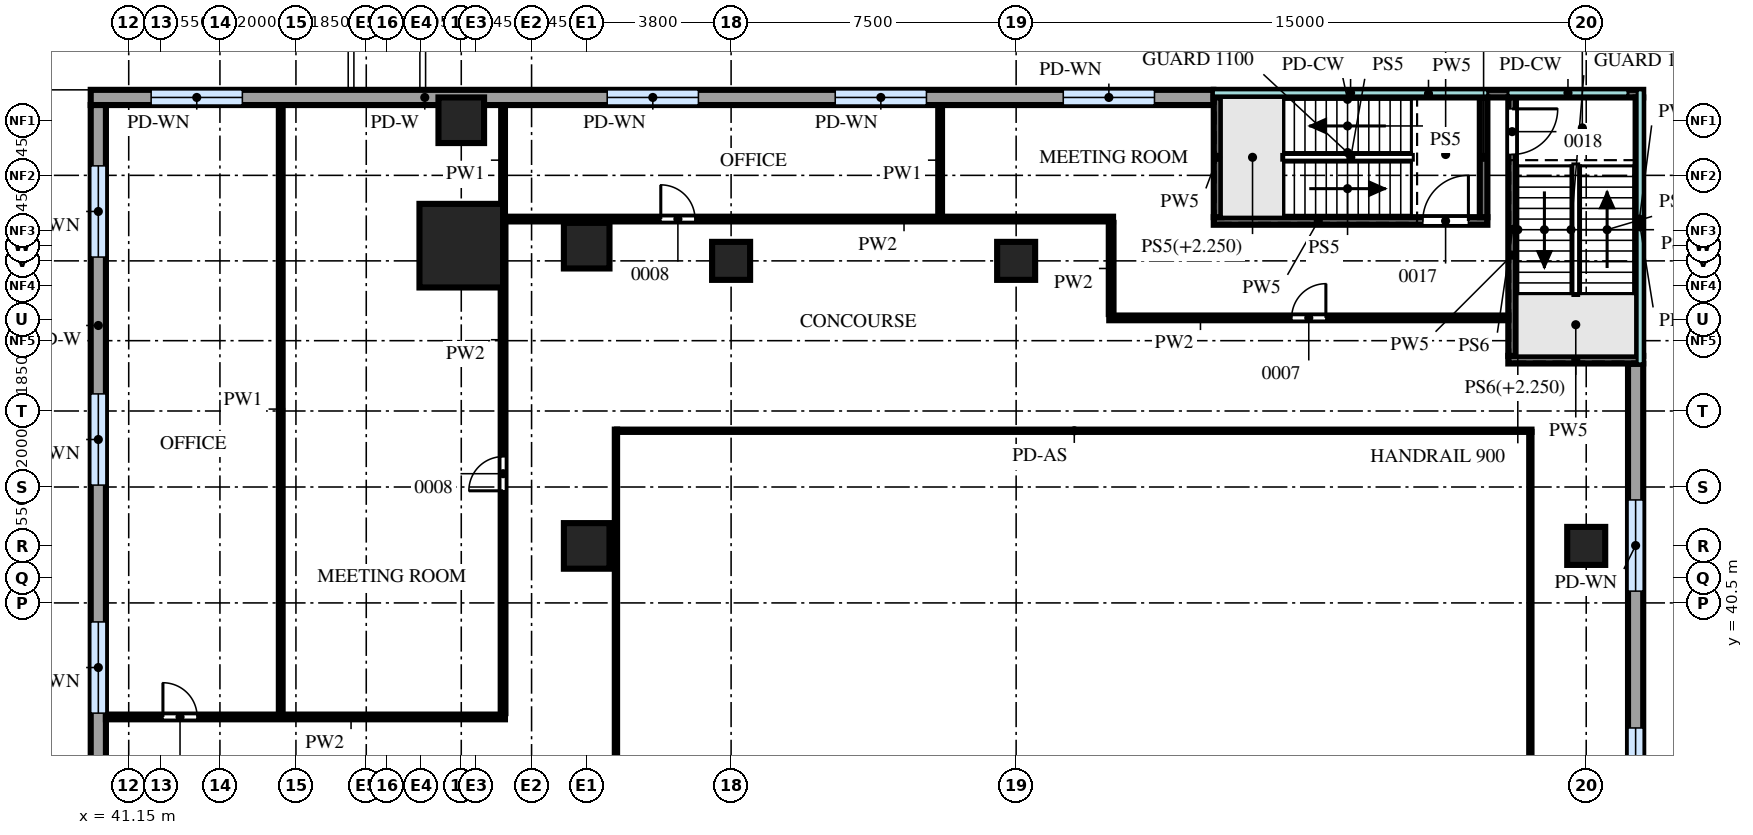
"""IFC4 building model, lengths in metres.
Left out: names, types, materials, properties, quantities, classifications, styles, units other than length and angle.
Written with IfcOpenShell. Run it as: python <this file> out.ifc"""

import sys

from ifc_helpers import new_model, si_unit, direction, frame, frame_2d, origin, origin_2d, place, context, subcontext, project, spatial, rectangle, extrude, source, transform, mapped, element, fill, save


model = new_model("IFC4")
c1 = context("Model", 3, precision=1e-05, world=origin(), true_north=direction((0.0, 1.0)))
c2 = subcontext(c1, "Body", "Model", "MODEL_VIEW")
j1 = project(units=[si_unit("LENGTHUNIT", "METRE"), si_unit("PLANEANGLEUNIT", "RADIAN")], contexts=[c1])
p1 = place(None, origin())
s1 = spatial("IfcSite", under=j1, at=p1, CompositionType="ELEMENT")
p2 = place(p1, origin())
s2 = spatial("IfcBuilding", under=s1, at=p2, CompositionType="ELEMENT")
p3 = place(p2, frame((0.0, 0.0, 28.5)))
s3 = spatial("IfcBuildingStorey", under=s2, at=p3, CompositionType="ELEMENT", Elevation=28.5)
m1 = source(origin(), c2, "Body", "SweptSolid", [
    extrude(rectangle(XDim=2.2, YDim=2.2, at=origin_2d()), origin(), (0.0, 0.0, 1.0), 4.5),
])
p4 = place(p3, frame((49.9, 49.9, 0.0), z_axis=(0.0, 0.0, 1.0), x_axis=(1.0, 0.0, 0.0)))
e1 = element("IfcColumn", 1, at=p4, inside=s3, PredefinedType="COLUMN", context=c2, shape_type="MappedRepresentation", body=[
    mapped(m1, transform((0.0, 0.0, 0.0))),
])
m2 = source(origin(), c2, "Body", "SweptSolid", [
    extrude(rectangle(XDim=1.2, YDim=1.2, at=origin_2d()), origin(), (0.0, 0.0, 1.0), 4.0),
])
for number, where, z_axis, x_axis in (
    (2, (53.2, 42.0, 0.0), (0.0, 0.0, 1.0), (1.0, 0.0, 0.0)),
    (3, (53.2, 49.9, 0.0), (0.0, 0.0, 1.0), (1.0, 0.0, 0.0)),
    (4, (49.9, 53.2, 0.0), (0.0, 0.0, 1.0), (1.0, 0.0, 0.0)),
):
    element("IfcColumn", number, at=place(p3, frame(where, z_axis=z_axis, x_axis=x_axis)), inside=s3, PredefinedType="COLUMN", context=c2, shape_type="MappedRepresentation", body=[
        mapped(m2, transform((0.0, 0.0, 0.0))),
    ])
m3 = source(origin(), c2, "Body", "SweptSolid", [
    extrude(rectangle(XDim=1.0, YDim=1.0, at=origin_2d()), origin(), (0.0, 0.0, 1.0), 4.5),
])
for number, where, z_axis, x_axis in (
    (5, (57.0, 49.5, 0.0), (0.0, 0.0, 1.0), (1.0, 0.0, 0.0)),
    (6, (64.5, 49.5, 0.0), (0.0, 0.0, 1.0), (1.0, 0.0, 0.0)),
    (7, (79.5, 42.0, 0.0), (0.0, 0.0, 1.0), (1.0, 0.0, 0.0)),
):
    element("IfcColumn", number, at=place(p3, frame(where, z_axis=z_axis, x_axis=x_axis)), inside=s3, PredefinedType="COLUMN", context=c2, shape_type="MappedRepresentation", body=[
        mapped(m3, transform((0.0, 0.0, 0.0))),
    ])
m4 = source(origin(), c2, "Body", "SweptSolid", [
    extrude(rectangle(XDim=39.58, YDim=0.4, at=frame_2d((19.79, 0.0))), origin(), (0.0, 0.0, 1.0), 4.2),
])
p5 = place(p3, frame((80.8, 7.21, 0.0), z_axis=(0.0, 0.0, 1.0), x_axis=(0.0, 1.0, 0.0)))
e8 = element("IfcWall", 8, at=p5, inside=s3, PredefinedType="SOLIDWALL", context=c2, shape_type="MappedRepresentation", body=[
    mapped(m4, transform((0.0, 0.0, 0.0))),
])
m5 = source(origin(), c2, "Body", "SweptSolid", [
    extrude(rectangle(XDim=2.4, YDim=2.4, at=frame_2d((1.2, 1.2))), frame((0.0, 0.21, 0.0), z_axis=(0.0, -1.0, 0.0), x_axis=(1.0, 0.0, 0.0)), (0.0, 0.0, 1.0), 0.42),
])
p6 = place(p5, frame((3.6, 0.0, 1.0)))
e9 = element("IfcOpeningElement", 9, at=p6, cuts=e8, PredefinedType="OPENING", context=c2, shape_type="MappedRepresentation", body=[
    mapped(m5, transform((0.0, 0.0, 0.0))),
])
p7 = place(p5, frame((9.6, 0.0, 1.0)))
e10 = element("IfcOpeningElement", 10, at=p7, cuts=e8, PredefinedType="OPENING", context=c2, shape_type="MappedRepresentation", body=[
    mapped(m5, transform((0.0, 0.0, 0.0))),
])
p8 = place(p5, frame((15.6, 0.0, 1.0)))
e11 = element("IfcOpeningElement", 11, at=p8, cuts=e8, PredefinedType="OPENING", context=c2, shape_type="MappedRepresentation", body=[
    mapped(m5, transform((0.0, 0.0, 0.0))),
])
p9 = place(p5, frame((21.6, 0.0, 1.0)))
e12 = element("IfcOpeningElement", 12, at=p9, cuts=e8, PredefinedType="OPENING", context=c2, shape_type="MappedRepresentation", body=[
    mapped(m5, transform((0.0, 0.0, 0.0))),
])
p10 = place(p5, frame((27.6, 0.0, 1.0)))
e13 = element("IfcOpeningElement", 13, at=p10, cuts=e8, PredefinedType="OPENING", context=c2, shape_type="MappedRepresentation", body=[
    mapped(m5, transform((0.0, 0.0, 0.0))),
])
p11 = place(p5, frame((33.6, 0.0, 1.0)))
e14 = element("IfcOpeningElement", 14, at=p11, cuts=e8, PredefinedType="OPENING", context=c2, shape_type="MappedRepresentation", body=[
    mapped(m5, transform((0.0, 0.0, 0.0))),
])
m6 = source(origin(), c2, "Body", "SweptSolid", [
    extrude(rectangle(XDim=29.54, YDim=0.4, at=frame_2d((14.77, 0.0))), origin(), (0.0, 0.0, 1.0), 4.2),
])
p12 = place(p3, frame((69.69, 53.8, 0.0), z_axis=(0.0, 0.0, 1.0), x_axis=(-1.0, 0.0, 0.0)))
e15 = element("IfcWall", 15, at=p12, inside=s3, PredefinedType="SOLIDWALL", context=c2, shape_type="MappedRepresentation", body=[
    mapped(m6, transform((0.0, 0.0, 0.0))),
])
p13 = place(p12, frame((1.55, 0.0, 1.0)))
e16 = element("IfcOpeningElement", 16, at=p13, cuts=e15, PredefinedType="OPENING", context=c2, shape_type="MappedRepresentation", body=[
    mapped(m5, transform((0.0, 0.0, 0.0))),
])
p14 = place(p12, frame((7.55, 0.0, 1.0)))
e17 = element("IfcOpeningElement", 17, at=p14, cuts=e15, PredefinedType="OPENING", context=c2, shape_type="MappedRepresentation", body=[
    mapped(m5, transform((0.0, 0.0, 0.0))),
])
p15 = place(p12, frame((13.55, 0.0, 1.0)))
e18 = element("IfcOpeningElement", 18, at=p15, cuts=e15, PredefinedType="OPENING", context=c2, shape_type="MappedRepresentation", body=[
    mapped(m5, transform((0.0, 0.0, 0.0))),
])
p16 = place(p12, frame((25.55, 0.0, 1.0)))
e19 = element("IfcOpeningElement", 19, at=p16, cuts=e15, PredefinedType="OPENING", context=c2, shape_type="MappedRepresentation", body=[
    mapped(m5, transform((0.0, 0.0, 0.0))),
])
m7 = source(origin(), c2, "Body", "SweptSolid", [
    extrude(rectangle(XDim=17.6, YDim=0.4, at=frame_2d((8.8, 0.0))), origin(), (0.0, 0.0, 1.0), 4.2),
])
p17 = place(p3, frame((40.35, 53.6, 0.0), z_axis=(0.0, 0.0, 1.0), x_axis=(0.0, -1.0, 0.0)))
e20 = element("IfcWall", 20, at=p17, inside=s3, PredefinedType="SOLIDWALL", context=c2, shape_type="MappedRepresentation", body=[
    mapped(m7, transform((0.0, 0.0, 0.0))),
])
p18 = place(p17, frame((1.6, 0.0, 1.0)))
e21 = element("IfcOpeningElement", 21, at=p18, cuts=e20, PredefinedType="OPENING", context=c2, shape_type="MappedRepresentation", body=[
    mapped(m5, transform((0.0, 0.0, 0.0))),
])
p19 = place(p17, frame((7.6, 0.0, 1.0)))
e22 = element("IfcOpeningElement", 22, at=p19, cuts=e20, PredefinedType="OPENING", context=c2, shape_type="MappedRepresentation", body=[
    mapped(m5, transform((0.0, 0.0, 0.0))),
])
p20 = place(p17, frame((13.6, 0.0, 1.0)))
e23 = element("IfcOpeningElement", 23, at=p20, cuts=e20, PredefinedType="OPENING", context=c2, shape_type="MappedRepresentation", body=[
    mapped(m5, transform((0.0, 0.0, 0.0))),
])
m8 = source(origin(), c2, "Body", "SweptSolid", [
    extrude(rectangle(XDim=36.06, YDim=0.06, at=frame_2d((18.03, 0.0))), origin(), (0.0, 0.0, 1.0), 4.2),
])
p21 = place(p3, frame((78.03, 8.94, 0.0), z_axis=(0.0, 0.0, 1.0), x_axis=(0.0, 1.0, 0.0)))
e24 = element("IfcWall", 24, at=p21, inside=s3, PredefinedType="SOLIDWALL", context=c2, shape_type="MappedRepresentation", body=[
    mapped(m8, transform((0.0, 0.0, 0.0))),
])
m9 = source(origin(), c2, "Body", "SweptSolid", [
    extrude(rectangle(XDim=24.06, YDim=0.06, at=frame_2d((12.03, 0.0))), origin(), (0.0, 0.0, 1.0), 4.2),
])
p22 = place(p3, frame((78.06, 45.03, 0.0), z_axis=(0.0, 0.0, 1.0), x_axis=(-1.0, 0.0, 0.0)))
e25 = element("IfcWall", 25, at=p22, inside=s3, PredefinedType="SOLIDWALL", context=c2, shape_type="MappedRepresentation", body=[
    mapped(m9, transform((0.0, 0.0, 0.0))),
])
p23 = place(p3, frame((53.97, 45.06, 0.0), z_axis=(0.0, 0.0, 1.0), x_axis=(0.0, -1.0, 0.0)))
e26 = element("IfcWall", 26, at=p23, inside=s3, PredefinedType="SOLIDWALL", context=c2, shape_type="MappedRepresentation", body=[
    mapped(m8, transform((0.0, 0.0, 0.0))),
])
m10 = source(origin(), c2, "Body", "SweptSolid", [
    extrude(rectangle(XDim=7.2, YDim=0.2, at=frame_2d((3.6, 0.0))), origin(), (0.0, 0.0, 1.0), 4.0),
])
p24 = place(p3, frame((69.7, 50.55, 0.0), z_axis=(0.0, 0.0, 1.0), x_axis=(1.0, 0.0, 0.0)))
e27 = element("IfcWall", 27, at=p24, inside=s3, PredefinedType="PARTITIONING", context=c2, shape_type="MappedRepresentation", body=[
    mapped(m10, transform((0.0, 0.0, 0.0))),
])
m11 = source(origin(), c2, "Body", "SweptSolid", [
    extrude(rectangle(XDim=1.2, YDim=2.1, at=frame_2d((0.6, 1.05))), frame((0.0, 0.11, 0.0), z_axis=(0.0, -1.0, 0.0), x_axis=(1.0, 0.0, 0.0)), (0.0, 0.0, 1.0), 0.22),
])
p25 = place(p24, frame((5.5, 0.0, 0.0)))
e28 = element("IfcOpeningElement", 28, at=p25, cuts=e27, PredefinedType="OPENING", context=c2, shape_type="MappedRepresentation", body=[
    mapped(m11, transform((0.0, 0.0, 0.0))),
])
m12 = source(origin(), c2, "Body", "SweptSolid", [
    extrude(rectangle(XDim=11.3, YDim=0.2, at=frame_2d((5.65, 0.0))), origin(), (0.0, 0.0, 1.0), 4.0),
])
p26 = place(p3, frame((69.7, 53.9, 0.0), z_axis=(0.0, 0.0, 1.0), x_axis=(1.0, 0.0, 0.0)))
e29 = element("IfcWall", 29, at=p26, inside=s3, PredefinedType="PARTITIONING", context=c2, shape_type="MappedRepresentation", body=[
    mapped(m12, transform((0.0, 0.0, 0.0))),
])
m13 = source(origin(), c2, "Body", "SweptSolid", [
    extrude(rectangle(XDim=3.15, YDim=0.2, at=frame_2d((1.575, 0.0))), origin(), (0.0, 0.0, 1.0), 4.0),
])
for number, where, z_axis, x_axis in (
    (30, (69.8, 50.65, 0.0), (0.0, 0.0, 1.0), (0.0, 1.0, 0.0)),
    (31, (76.8, 50.65, 0.0), (0.0, 0.0, 1.0), (0.0, 1.0, 0.0)),
):
    element("IfcWall", number, at=place(p3, frame(where, z_axis=z_axis, x_axis=x_axis)), inside=s3, PredefinedType="PARTITIONING", context=c2, shape_type="MappedRepresentation", body=[
        mapped(m13, transform((0.0, 0.0, 0.0))),
    ])
m14 = source(origin(), c2, "Body", "SweptSolid", [
    extrude(rectangle(XDim=3.55, YDim=0.2, at=frame_2d((1.775, 0.0))), origin(), (0.0, 0.0, 1.0), 4.0),
])
p27 = place(p3, frame((77.45, 46.9, 0.0), z_axis=(0.0, 0.0, 1.0), x_axis=(1.0, 0.0, 0.0)))
e32 = element("IfcWall", 32, at=p27, inside=s3, PredefinedType="PARTITIONING", context=c2, shape_type="MappedRepresentation", body=[
    mapped(m14, transform((0.0, 0.0, 0.0))),
])
m15 = source(origin(), c2, "Body", "SweptSolid", [
    extrude(rectangle(XDim=6.8, YDim=0.2, at=frame_2d((3.4, 0.0))), origin(), (0.0, 0.0, 1.0), 4.0),
])
p28 = place(p3, frame((77.55, 47.0, 0.0), z_axis=(0.0, 0.0, 1.0), x_axis=(0.0, 1.0, 0.0)))
e33 = element("IfcWall", 33, at=p28, inside=s3, PredefinedType="PARTITIONING", context=c2, shape_type="MappedRepresentation", body=[
    mapped(m15, transform((0.0, 0.0, 0.0))),
])
p29 = place(p28, frame((5.3, 0.0, 0.0)))
e34 = element("IfcOpeningElement", 34, at=p29, cuts=e33, PredefinedType="OPENING", context=c2, shape_type="MappedRepresentation", body=[
    mapped(m11, transform((0.0, 0.0, 0.0))),
])
p30 = place(p3, frame((80.9, 47.0, 0.0), z_axis=(0.0, 0.0, 1.0), x_axis=(0.0, 1.0, 0.0)))
e35 = element("IfcWall", 35, at=p30, inside=s3, PredefinedType="PARTITIONING", context=c2, shape_type="MappedRepresentation", body=[
    mapped(m15, transform((0.0, 0.0, 0.0))),
])
m16 = source(origin(), c2, "Body", "SweptSolid", [
    extrude(rectangle(XDim=10.5, YDim=0.125, at=frame_2d((5.25, 0.0))), origin(), (0.0, 0.0, 1.0), 4.0),
])
p31 = place(p3, frame((40.55, 37.5, 0.0), z_axis=(0.0, 0.0, 1.0), x_axis=(1.0, 0.0, 0.0)))
e36 = element("IfcWall", 36, at=p31, inside=s3, PredefinedType="PARTITIONING", context=c2, shape_type="MappedRepresentation", body=[
    mapped(m16, transform((0.0, 0.0, 0.0))),
])
m17 = source(origin(), c2, "Body", "SweptSolid", [
    extrude(rectangle(XDim=0.9, YDim=2.1, at=frame_2d((0.45, 1.05))), frame((0.0, 0.073, 0.0), z_axis=(0.0, -1.0, 0.0), x_axis=(1.0, 0.0, 0.0)), (0.0, 0.0, 1.0), 0.145),
])
p32 = place(p31, frame((1.5, 0.0, 0.0)))
e37 = element("IfcOpeningElement", 37, at=p32, cuts=e36, PredefinedType="OPENING", context=c2, shape_type="MappedRepresentation", body=[
    mapped(m17, transform((0.0, 0.0, 0.0))),
])
m18 = source(origin(), c2, "Body", "SweptSolid", [
    extrude(rectangle(XDim=16.0, YDim=0.1, at=frame_2d((8.0, 0.0))), origin(), (0.0, 0.0, 1.0), 4.0),
])
p33 = place(p3, frame((45.15, 37.6, 0.0), z_axis=(0.0, 0.0, 1.0), x_axis=(0.0, 1.0, 0.0)))
e38 = element("IfcWall", 38, at=p33, inside=s3, PredefinedType="PARTITIONING", context=c2, shape_type="MappedRepresentation", body=[
    mapped(m18, transform((0.0, 0.0, 0.0))),
])
m19 = source(origin(), c2, "Body", "SweptSolid", [
    extrude(rectangle(XDim=12.9, YDim=0.125, at=frame_2d((6.45, 0.0))), origin(), (0.0, 0.0, 1.0), 4.0),
])
p34 = place(p3, frame((51.0, 37.6, 0.0), z_axis=(0.0, 0.0, 1.0), x_axis=(0.0, 1.0, 0.0)))
e39 = element("IfcWall", 39, at=p34, inside=s3, PredefinedType="PARTITIONING", context=c2, shape_type="MappedRepresentation", body=[
    mapped(m19, transform((0.0, 0.0, 0.0))),
])
p35 = place(p34, frame((5.85, 0.0, 0.0)))
e40 = element("IfcOpeningElement", 40, at=p35, cuts=e39, PredefinedType="OPENING", context=c2, shape_type="MappedRepresentation", body=[
    mapped(m17, transform((0.0, 0.0, 0.0))),
])
p36 = place(p3, frame((66.95, 48.0, 0.0), z_axis=(0.0, 0.0, 1.0), x_axis=(1.0, 0.0, 0.0)))
e41 = element("IfcWall", 41, at=p36, inside=s3, PredefinedType="PARTITIONING", context=c2, shape_type="MappedRepresentation", body=[
    mapped(m16, transform((0.0, 0.0, 0.0))),
])
p37 = place(p36, frame((4.8, 0.0, 0.0)))
e42 = element("IfcOpeningElement", 42, at=p37, cuts=e41, PredefinedType="OPENING", context=c2, shape_type="MappedRepresentation", body=[
    mapped(m17, transform((0.0, 0.0, 0.0))),
])
m20 = source(origin(), c2, "Body", "SweptSolid", [
    extrude(rectangle(XDim=2.4, YDim=0.125, at=frame_2d((1.2, 0.0))), origin(), (0.0, 0.0, 1.0), 4.0),
])
p38 = place(p3, frame((67.0, 48.1, 0.0), z_axis=(0.0, 0.0, 1.0), x_axis=(0.0, 1.0, 0.0)))
e43 = element("IfcWall", 43, at=p38, inside=s3, PredefinedType="PARTITIONING", context=c2, shape_type="MappedRepresentation", body=[
    mapped(m20, transform((0.0, 0.0, 0.0))),
])
m21 = source(origin(), c2, "Body", "SweptSolid", [
    extrude(rectangle(XDim=16.1, YDim=0.125, at=frame_2d((8.05, 0.0))), origin(), (0.0, 0.0, 1.0), 4.0),
])
p39 = place(p3, frame((50.95, 50.6, 0.0), z_axis=(0.0, 0.0, 1.0), x_axis=(1.0, 0.0, 0.0)))
e44 = element("IfcWall", 44, at=p39, inside=s3, PredefinedType="PARTITIONING", context=c2, shape_type="MappedRepresentation", body=[
    mapped(m21, transform((0.0, 0.0, 0.0))),
])
p40 = place(p39, frame((4.2, 0.0, 0.0)))
e45 = element("IfcOpeningElement", 45, at=p40, cuts=e44, PredefinedType="OPENING", context=c2, shape_type="MappedRepresentation", body=[
    mapped(m17, transform((0.0, 0.0, 0.0))),
])
m22 = source(origin(), c2, "Body", "SweptSolid", [
    extrude(rectangle(XDim=2.9, YDim=0.1, at=frame_2d((1.45, 0.0))), origin(), (0.0, 0.0, 1.0), 4.0),
])
for number, where, z_axis, x_axis in (
    (46, (51.0, 50.7, 0.0), (0.0, 0.0, 1.0), (0.0, 1.0, 0.0)),
    (47, (62.5, 50.7, 0.0), (0.0, 0.0, 1.0), (0.0, 1.0, 0.0)),
):
    element("IfcWall", number, at=place(p3, frame(where, z_axis=z_axis, x_axis=x_axis)), inside=s3, PredefinedType="PARTITIONING", context=c2, shape_type="MappedRepresentation", body=[
        mapped(m22, transform((0.0, 0.0, 0.0))),
    ])
m23 = source(origin(), c2, "Body", "SweptSolid", [
    extrude(rectangle(XDim=2.4, YDim=2.4, at=frame_2d((1.2, 1.2))), frame((0.0, 0.03, 0.0), z_axis=(0.0, -1.0, 0.0), x_axis=(1.0, 0.0, 0.0)), (0.0, 0.0, 1.0), 0.06),
])
p41 = place(p10, origin())
e48 = element("IfcWindow", 48, at=p41, inside=s3, PartitioningType="SINGLE_PANEL", PredefinedType="WINDOW", context=c2, shape_type="MappedRepresentation", body=[
    mapped(m23, transform((0.0, 0.0, 0.0))),
])
fill(e13, e48)
p42 = place(p11, origin())
e49 = element("IfcWindow", 49, at=p42, inside=s3, PartitioningType="SINGLE_PANEL", PredefinedType="WINDOW", context=c2, shape_type="MappedRepresentation", body=[
    mapped(m23, transform((0.0, 0.0, 0.0))),
])
fill(e14, e49)
p43 = place(p13, origin())
e50 = element("IfcWindow", 50, at=p43, inside=s3, PartitioningType="SINGLE_PANEL", PredefinedType="WINDOW", context=c2, shape_type="MappedRepresentation", body=[
    mapped(m23, transform((0.0, 0.0, 0.0))),
])
fill(e16, e50)
p44 = place(p14, origin())
e51 = element("IfcWindow", 51, at=p44, inside=s3, PartitioningType="SINGLE_PANEL", PredefinedType="WINDOW", context=c2, shape_type="MappedRepresentation", body=[
    mapped(m23, transform((0.0, 0.0, 0.0))),
])
fill(e17, e51)
p45 = place(p15, origin())
e52 = element("IfcWindow", 52, at=p45, inside=s3, PartitioningType="SINGLE_PANEL", PredefinedType="WINDOW", context=c2, shape_type="MappedRepresentation", body=[
    mapped(m23, transform((0.0, 0.0, 0.0))),
])
fill(e18, e52)
p46 = place(p16, origin())
e53 = element("IfcWindow", 53, at=p46, inside=s3, PartitioningType="SINGLE_PANEL", PredefinedType="WINDOW", context=c2, shape_type="MappedRepresentation", body=[
    mapped(m23, transform((0.0, 0.0, 0.0))),
])
fill(e19, e53)
p47 = place(p18, origin())
e54 = element("IfcWindow", 54, at=p47, inside=s3, PartitioningType="SINGLE_PANEL", PredefinedType="WINDOW", context=c2, shape_type="MappedRepresentation", body=[
    mapped(m23, transform((0.0, 0.0, 0.0))),
])
fill(e21, e54)
p48 = place(p19, origin())
e55 = element("IfcWindow", 55, at=p48, inside=s3, PartitioningType="SINGLE_PANEL", PredefinedType="WINDOW", context=c2, shape_type="MappedRepresentation", body=[
    mapped(m23, transform((0.0, 0.0, 0.0))),
])
fill(e22, e55)
p49 = place(p20, origin())
e56 = element("IfcWindow", 56, at=p49, inside=s3, PartitioningType="SINGLE_PANEL", PredefinedType="WINDOW", context=c2, shape_type="MappedRepresentation", body=[
    mapped(m23, transform((0.0, 0.0, 0.0))),
])
fill(e23, e56)
m24 = source(origin(), c2, "Body", "SweptSolid", [
    extrude(rectangle(XDim=0.9, YDim=2.1, at=frame_2d((0.45, 1.05))), frame((0.0, 0.025, 0.0), z_axis=(0.0, -1.0, 0.0), x_axis=(1.0, 0.0, 0.0)), (0.0, 0.0, 1.0), 0.05),
])
p50 = place(p32, origin())
e57 = element("IfcDoor", 57, at=p50, inside=s3, OperationType="SINGLE_SWING_RIGHT", PredefinedType="DOOR", context=c2, shape_type="MappedRepresentation", body=[
    mapped(m24, transform((0.0, 0.0, 0.0))),
])
fill(e37, e57)
p51 = place(p35, origin())
e58 = element("IfcDoor", 58, at=p51, inside=s3, OperationType="SINGLE_SWING_RIGHT", PredefinedType="DOOR", context=c2, shape_type="MappedRepresentation", body=[
    mapped(m24, transform((0.0, 0.0, 0.0))),
])
fill(e40, e58)
p52 = place(p40, origin())
e59 = element("IfcDoor", 59, at=p52, inside=s3, OperationType="SINGLE_SWING_RIGHT", PredefinedType="DOOR", context=c2, shape_type="MappedRepresentation", body=[
    mapped(m24, transform((0.0, 0.0, 0.0))),
])
fill(e45, e59)
p53 = place(p37, origin())
e60 = element("IfcDoor", 60, at=p53, inside=s3, OperationType="SINGLE_SWING_LEFT", PredefinedType="DOOR", context=c2, shape_type="MappedRepresentation", body=[
    mapped(m24, transform((0.0, 0.0, 0.0))),
])
fill(e42, e60)
m25 = source(origin(), c2, "Body", "SweptSolid", [
    extrude(rectangle(XDim=1.2, YDim=2.1, at=frame_2d((0.6, 1.05))), frame((0.0, 0.025, 0.0), z_axis=(0.0, -1.0, 0.0), x_axis=(1.0, 0.0, 0.0)), (0.0, 0.0, 1.0), 0.05),
])
p54 = place(p25, origin())
e61 = element("IfcDoor", 61, at=p54, inside=s3, OperationType="SINGLE_SWING_LEFT", PredefinedType="DOOR", context=c2, shape_type="MappedRepresentation", body=[
    mapped(m25, transform((0.0, 0.0, 0.0))),
])
fill(e28, e61)
p55 = place(p29, origin())
e62 = element("IfcDoor", 62, at=p55, inside=s3, OperationType="SINGLE_SWING_RIGHT", PredefinedType="DOOR", context=c2, shape_type="MappedRepresentation", body=[
    mapped(m25, transform((0.0, 0.0, 0.0))),
])
fill(e34, e62)
save(model, sys.argv[1])
